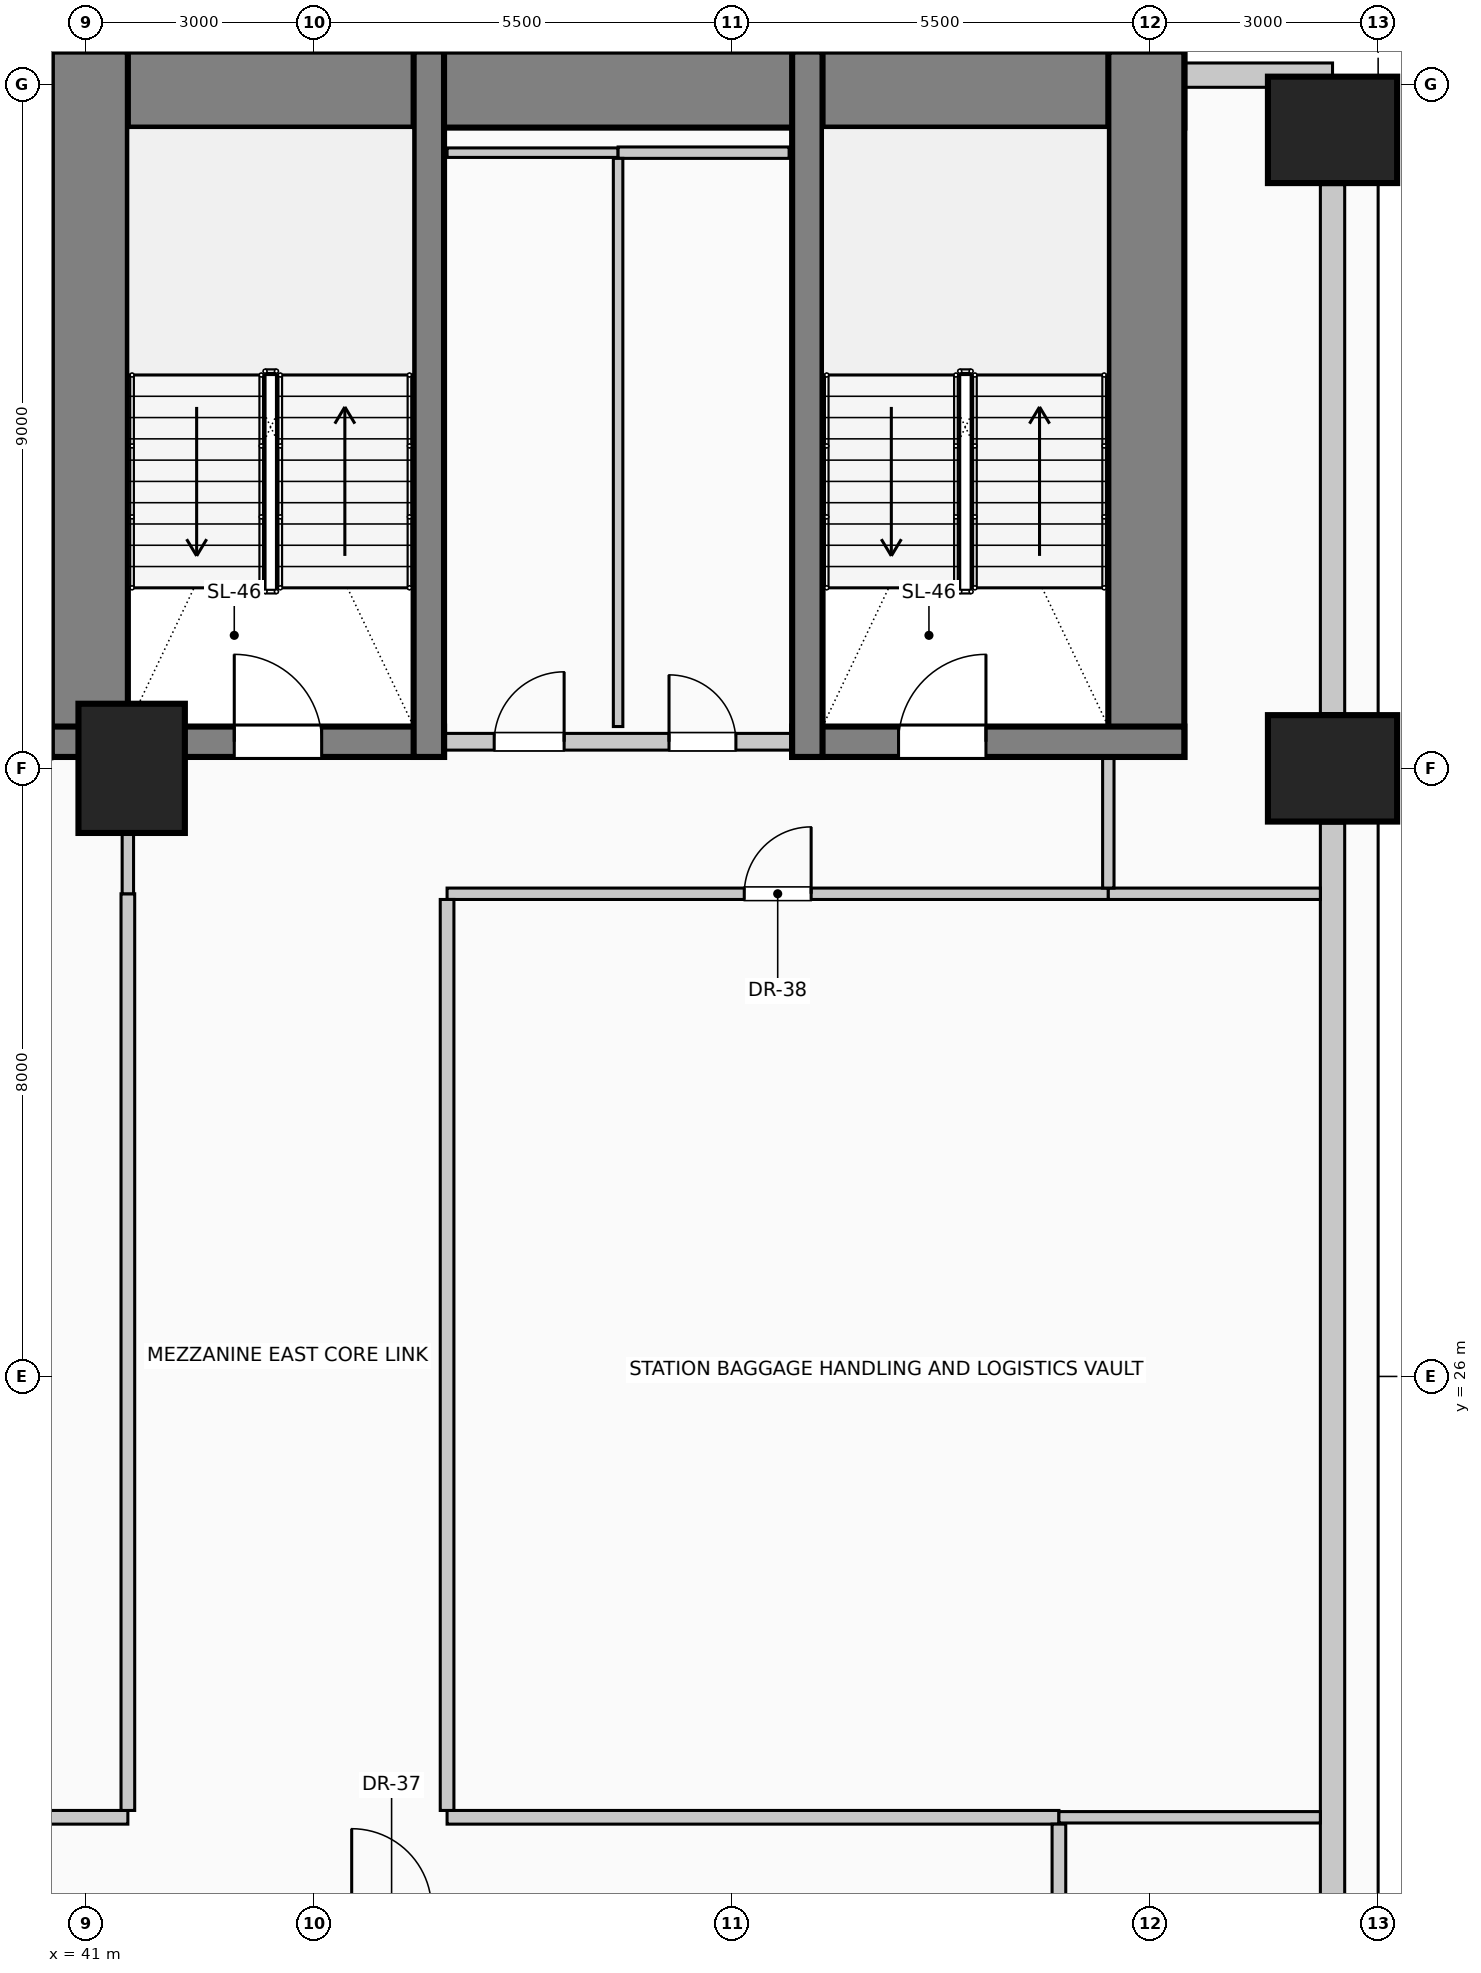
"""IFC4 building model, lengths in metres.
Left out: names, types, materials, properties, quantities, classifications, styles, units other than length and angle.
Written with IfcOpenShell. Run it as: python <this file> out.ifc"""

import sys

from ifc_helpers import new_model, si_unit, direction, frame, frame_2d, origin, origin_2d, place, context, subcontext, project, spatial, rectangle, extrude, element, fill, save


model = new_model("IFC4")
c1 = context("Model", 3, precision=1e-05, world=origin(), true_north=direction((0.0, 1.0)))
c2 = subcontext(c1, "Body", "Model", "MODEL_VIEW")
j1 = project(units=[si_unit("LENGTHUNIT", "METRE"), si_unit("PLANEANGLEUNIT", "RADIAN")], contexts=[c1])
p1 = place(None, origin())
s1 = spatial("IfcSite", under=j1, at=p1, CompositionType="ELEMENT")
p2 = place(p1, origin())
s2 = spatial("IfcBuilding", under=s1, at=p2, CompositionType="ELEMENT")
p3 = place(p2, frame((0.0, 0.0, 13.5)))
s3 = spatial("IfcBuildingStorey", under=s2, at=p3, CompositionType="ELEMENT", Elevation=13.5)
p4 = place(p3, frame((40.55, 42.93, 0.0), z_axis=(0.0, 0.0, 1.0), x_axis=(1.0, 0.0, 0.0)))
e1 = element("IfcWall", 1, at=p4, inside=s3, PredefinedType="SHEAR", context=c2, shape_type="SweptSolid", body=[
    extrude(rectangle(XDim=14.9, YDim=1.0, at=frame_2d((7.45, 0.0))), origin(), (0.0, 0.0, 1.0), 4.05),
])
for number, where, z_axis, x_axis in (
    (2, (41.05, 34.15, 0.0), (0.0, 0.0, 1.0), (0.0, 1.0, 0.0)),
    (3, (54.95, 34.15, 0.0), (0.0, 0.0, 1.0), (0.0, 1.0, 0.0)),
):
    element("IfcWall", number, at=place(p3, frame(where, z_axis=z_axis, x_axis=x_axis)), inside=s3, PredefinedType="SHEAR", context=c2, shape_type="SweptSolid", body=[
        extrude(rectangle(XDim=9.28, YDim=1.0, at=frame_2d((4.64, 0.0))), origin(), (0.0, 0.0, 1.0), 4.05),
    ])
p5 = place(p3, frame((40.55, 34.35, 0.0), z_axis=(0.0, 0.0, 1.0), x_axis=(1.0, 0.0, 0.0)))
e4 = element("IfcWall", 4, at=p5, inside=s3, PredefinedType="SHEAR", context=c2, shape_type="SweptSolid", body=[
    extrude(rectangle(XDim=5.16, YDim=0.4, at=frame_2d((2.58, 0.0))), origin(), (0.0, 0.0, 1.0), 4.05),
])
p6 = place(p5, frame((2.4, 0.0, 0.0)))
e5 = element("IfcOpeningElement", 5, at=p6, cuts=e4, PredefinedType="OPENING", context=c2, shape_type="SweptSolid", body=[
    extrude(rectangle(XDim=1.15, YDim=2.2, at=frame_2d((0.575, 1.1))), frame((0.0, 0.21, 0.0), z_axis=(0.0, -1.0, 0.0), x_axis=(1.0, 0.0, 0.0)), (0.0, 0.0, 1.0), 0.42),
])
p7 = place(p3, frame((45.51, 34.15, 0.0), z_axis=(0.0, 0.0, 1.0), x_axis=(0.0, 1.0, 0.0)))
e6 = element("IfcWall", 6, at=p7, inside=s3, PredefinedType="SHEAR", context=c2, shape_type="SweptSolid", body=[
    extrude(rectangle(XDim=9.28, YDim=0.4, at=frame_2d((4.64, 0.0))), origin(), (0.0, 0.0, 1.0), 4.05),
])
p8 = place(p3, frame((50.29, 34.35, 0.0), z_axis=(0.0, 0.0, 1.0), x_axis=(1.0, 0.0, 0.0)))
e7 = element("IfcWall", 7, at=p8, inside=s3, PredefinedType="SHEAR", context=c2, shape_type="SweptSolid", body=[
    extrude(rectangle(XDim=5.16, YDim=0.4, at=frame_2d((2.58, 0.0))), origin(), (0.0, 0.0, 1.0), 4.05),
])
p9 = place(p8, frame((1.4, 0.0, 0.0)))
e8 = element("IfcOpeningElement", 8, at=p9, cuts=e7, PredefinedType="OPENING", context=c2, shape_type="SweptSolid", body=[
    extrude(rectangle(XDim=1.15, YDim=2.2, at=frame_2d((0.575, 1.1))), frame((0.0, 0.21, 0.0), z_axis=(0.0, -1.0, 0.0), x_axis=(1.0, 0.0, 0.0)), (0.0, 0.0, 1.0), 0.42),
])
p10 = place(p3, frame((50.49, 34.15, 0.0), z_axis=(0.0, 0.0, 1.0), x_axis=(0.0, 1.0, 0.0)))
e9 = element("IfcWall", 9, at=p10, inside=s3, PredefinedType="SHEAR", context=c2, shape_type="SweptSolid", body=[
    extrude(rectangle(XDim=9.28, YDim=0.4, at=frame_2d((4.64, 0.0))), origin(), (0.0, 0.0, 1.0), 4.05),
])
for number, where, z_axis, x_axis in (
    (10, (57.4, 34.0, 0.0), (0.0, 0.0, 1.0), (0.0, 1.0, 0.0)),
    (11, (57.4, 42.4, 0.0), (0.0, 0.0, 1.0), (0.0, 1.0, 0.0)),
    (12, (41.6, 34.0, 0.0), (0.0, 0.0, 1.0), (1.0, 0.0, 0.0)),
):
    element("IfcColumn", number, at=place(p3, frame(where, z_axis=z_axis, x_axis=x_axis)), inside=s3, PredefinedType="COLUMN", context=c2, shape_type="SweptSolid", body=[
        extrude(rectangle(XDim=1.4, YDim=1.7, at=origin_2d()), origin(), (0.0, 0.0, 1.0), 4.05),
    ])
p11 = place(p3, frame((57.4, 33.28, 0.0), z_axis=(0.0, 0.0, 1.0), x_axis=(0.0, -1.0, 0.0)))
e13 = element("IfcWall", 13, at=p11, inside=s3, PredefinedType="SOLIDWALL", context=c2, shape_type="SweptSolid", body=[
    extrude(rectangle(XDim=14.56, YDim=0.32, at=frame_2d((7.28, 0.0))), origin(), (0.0, 0.0, 1.0), 2.7),
])
p12 = place(p3, frame((57.4, 41.68, 0.0), z_axis=(0.0, 0.0, 1.0), x_axis=(0.0, -1.0, 0.0)))
e14 = element("IfcWall", 14, at=p12, inside=s3, PredefinedType="SOLIDWALL", context=c2, shape_type="SweptSolid", body=[
    extrude(rectangle(XDim=6.96, YDim=0.32, at=frame_2d((3.48, 0.0))), origin(), (0.0, 0.0, 1.0), 2.7),
])
p13 = place(p3, frame((55.455, 43.12, 0.0), z_axis=(0.0, 0.0, 1.0), x_axis=(1.0, 0.0, 0.0)))
e15 = element("IfcWall", 15, at=p13, inside=s3, PredefinedType="SOLIDWALL", context=c2, shape_type="SweptSolid", body=[
    extrude(rectangle(XDim=1.945, YDim=0.32, at=frame_2d((0.972, 0.0))), origin(), (0.0, 0.0, 1.0), 3.65),
])
p14 = place(p3, frame((45.72, 34.35, 0.0), z_axis=(0.0, 0.0, 1.0), x_axis=(1.0, 0.0, 0.0)))
e16 = element("IfcWall", 16, at=p14, inside=s3, PredefinedType="PARTITIONING", context=c2, shape_type="SweptSolid", body=[
    extrude(rectangle(XDim=4.56, YDim=0.22, at=frame_2d((2.28, 0.0))), origin(), (0.0, 0.0, 1.0), 2.695),
])
p15 = place(p14, frame((0.65, 0.0, 0.0)))
e17 = element("IfcOpeningElement", 17, at=p15, cuts=e16, PredefinedType="OPENING", context=c2, shape_type="SweptSolid", body=[
    extrude(rectangle(XDim=0.92, YDim=2.1, at=frame_2d((0.46, 1.05))), frame((0.0, 0.12, 0.0), z_axis=(0.0, -1.0, 0.0), x_axis=(1.0, 0.0, 0.0)), (0.0, 0.0, 1.0), 0.24),
])
p16 = place(p14, frame((2.95, 0.0, 0.0)))
e18 = element("IfcOpeningElement", 18, at=p16, cuts=e16, PredefinedType="OPENING", context=c2, shape_type="SweptSolid", body=[
    extrude(rectangle(XDim=0.88, YDim=2.1, at=frame_2d((0.44, 1.05))), frame((0.0, 0.12, 0.0), z_axis=(0.0, -1.0, 0.0), x_axis=(1.0, 0.0, 0.0)), (0.0, 0.0, 1.0), 0.24),
])
p17 = place(p3, frame((27.2, 20.2, 0.0), z_axis=(0.0, 0.0, 1.0), x_axis=(1.0, 0.0, 0.0)))
e19 = element("IfcWall", 19, at=p17, inside=s3, PredefinedType="PARTITIONING", context=c2, shape_type="SweptSolid", body=[
    extrude(rectangle(XDim=14.35, YDim=0.18, at=frame_2d((7.175, 0.0))), origin(), (0.0, 0.0, 1.0), 3.65),
])
p18 = place(p17, frame((6.65, 0.0, 0.0)))
e20 = element("IfcOpeningElement", 20, at=p18, cuts=e19, PredefinedType="OPENING", context=c2, shape_type="SweptSolid", body=[
    extrude(rectangle(XDim=1.05, YDim=2.15, at=frame_2d((0.525, 1.075))), frame((0.0, 0.1, 0.0), z_axis=(0.0, -1.0, 0.0), x_axis=(1.0, 0.0, 0.0)), (0.0, 0.0, 1.0), 0.2),
])
p19 = place(p3, frame((45.75, 20.2, 0.0), z_axis=(0.0, 0.0, 1.0), x_axis=(1.0, 0.0, 0.0)))
e21 = element("IfcWall", 21, at=p19, inside=s3, PredefinedType="PARTITIONING", context=c2, shape_type="SweptSolid", body=[
    extrude(rectangle(XDim=8.05, YDim=0.18, at=frame_2d((4.025, 0.0))), origin(), (0.0, 0.0, 1.0), 3.65),
])
p20 = place(p3, frame((53.8, 20.2, 0.0), z_axis=(0.0, 0.0, 1.0), x_axis=(1.0, 0.0, 0.0)))
e22 = element("IfcWall", 22, at=p20, inside=s3, PredefinedType="PARTITIONING", context=c2, shape_type="SweptSolid", body=[
    extrude(rectangle(XDim=3.44, YDim=0.15, at=frame_2d((1.72, 0.0))), origin(), (0.0, 0.0, 1.0), 3.65),
])
p21 = place(p3, frame((45.75, 32.35, 0.0), z_axis=(0.0, 0.0, 1.0), x_axis=(1.0, 0.0, 0.0)))
e23 = element("IfcWall", 23, at=p21, inside=s3, PredefinedType="PARTITIONING", context=c2, shape_type="SweptSolid", body=[
    extrude(rectangle(XDim=8.7, YDim=0.15, at=frame_2d((4.35, 0.0))), origin(), (0.0, 0.0, 1.0), 3.65),
])
p22 = place(p21, frame((3.91, 0.0, 0.0)))
e24 = element("IfcOpeningElement", 24, at=p22, cuts=e23, PredefinedType="OPENING", context=c2, shape_type="SweptSolid", body=[
    extrude(rectangle(XDim=0.88, YDim=2.1, at=frame_2d((0.44, 1.05))), frame((0.0, 0.085, 0.0), z_axis=(0.0, -1.0, 0.0), x_axis=(1.0, 0.0, 0.0)), (0.0, 0.0, 1.0), 0.17),
])
p23 = place(p3, frame((54.45, 32.35, 0.0), z_axis=(0.0, 0.0, 1.0), x_axis=(1.0, 0.0, 0.0)))
e25 = element("IfcWall", 25, at=p23, inside=s3, PredefinedType="PARTITIONING", context=c2, shape_type="SweptSolid", body=[
    extrude(rectangle(XDim=2.79, YDim=0.15, at=frame_2d((1.395, 0.0))), origin(), (0.0, 0.0, 1.0), 3.65),
])
p24 = place(p3, frame((45.75, 42.1, 0.0), z_axis=(0.0, 0.0, 1.0), x_axis=(1.0, 0.0, 0.0)))
e26 = element("IfcWall", 26, at=p24, inside=s3, PredefinedType="PARTITIONING", context=c2, shape_type="SweptSolid", body=[
    extrude(rectangle(XDim=2.25, YDim=0.125, at=frame_2d((1.125, 0.0))), origin(), (0.0, 0.0, 1.0), 3.65),
])
p25 = place(p3, frame((48.0, 42.1, 0.0), z_axis=(0.0, 0.0, 1.0), x_axis=(1.0, 0.0, 0.0)))
e27 = element("IfcWall", 27, at=p25, inside=s3, PredefinedType="PARTITIONING", context=c2, shape_type="SweptSolid", body=[
    extrude(rectangle(XDim=2.25, YDim=0.15, at=frame_2d((1.125, 0.0))), origin(), (0.0, 0.0, 1.0), 3.65),
])
p26 = place(p3, frame((41.55, 20.29, 0.0), z_axis=(0.0, 0.0, 1.0), x_axis=(0.0, 1.0, 0.0)))
e28 = element("IfcWall", 28, at=p26, inside=s3, PredefinedType="PARTITIONING", context=c2, shape_type="SweptSolid", body=[
    extrude(rectangle(XDim=12.06, YDim=0.18, at=frame_2d((6.03, 0.0))), origin(), (0.0, 0.0, 1.0), 2.695),
])
p27 = place(p3, frame((41.55, 32.35, 0.0), z_axis=(0.0, 0.0, 1.0), x_axis=(0.0, 1.0, 0.0)))
e29 = element("IfcWall", 29, at=p27, inside=s3, PredefinedType="PARTITIONING", context=c2, shape_type="SweptSolid", body=[
    extrude(rectangle(XDim=0.8, YDim=0.15, at=frame_2d((0.4, 0.0))), origin(), (0.0, 0.0, 1.0), 2.695),
])
p28 = place(p3, frame((45.75, 20.29, 0.0), z_axis=(0.0, 0.0, 1.0), x_axis=(0.0, 1.0, 0.0)))
e30 = element("IfcWall", 30, at=p28, inside=s3, PredefinedType="PARTITIONING", context=c2, shape_type="SweptSolid", body=[
    extrude(rectangle(XDim=11.985, YDim=0.18, at=frame_2d((5.992, 0.0))), origin(), (0.0, 0.0, 1.0), 3.65),
])
p29 = place(p3, frame((48.0, 34.55, 0.0), z_axis=(0.0, 0.0, 1.0), x_axis=(0.0, 1.0, 0.0)))
e31 = element("IfcWall", 31, at=p29, inside=s3, PredefinedType="PARTITIONING", context=c2, shape_type="SweptSolid", body=[
    extrude(rectangle(XDim=7.475, YDim=0.125, at=frame_2d((3.737, 0.0))), origin(), (0.0, 0.0, 1.0), 3.65),
])
p30 = place(p3, frame((53.8, 19.09, 0.0), z_axis=(0.0, 0.0, 1.0), x_axis=(0.0, 1.0, 0.0)))
e32 = element("IfcWall", 32, at=p30, inside=s3, PredefinedType="PARTITIONING", context=c2, shape_type="SweptSolid", body=[
    extrude(rectangle(XDim=1.02, YDim=0.18, at=frame_2d((0.51, 0.0))), origin(), (0.0, 0.0, 1.0), 3.65),
])
p31 = place(p3, frame((54.45, 32.425, 0.0), z_axis=(0.0, 0.0, 1.0), x_axis=(0.0, 1.0, 0.0)))
e33 = element("IfcWall", 33, at=p31, inside=s3, PredefinedType="PARTITIONING", context=c2, shape_type="SweptSolid", body=[
    extrude(rectangle(XDim=1.725, YDim=0.15, at=frame_2d((0.862, 0.0))), origin(), (0.0, 0.0, 1.0), 3.65),
])
p32 = place(p6, origin())
e34 = element("IfcDoor", 34, at=p32, inside=s3, OperationType="SINGLE_SWING_LEFT", PredefinedType="DOOR", context=c2, shape_type="SweptSolid", body=[
    extrude(rectangle(XDim=1.15, YDim=2.2, at=frame_2d((0.575, 1.1))), frame((0.0, 0.025, 0.0), z_axis=(0.0, -1.0, 0.0), x_axis=(1.0, 0.0, 0.0)), (0.0, 0.0, 1.0), 0.05),
])
fill(e5, e34)
p33 = place(p15, origin())
e35 = element("IfcDoor", 35, at=p33, inside=s3, OperationType="SINGLE_SWING_RIGHT", PredefinedType="DOOR", context=c2, shape_type="SweptSolid", body=[
    extrude(rectangle(XDim=0.92, YDim=2.1, at=frame_2d((0.46, 1.05))), frame((0.0, 0.025, 0.0), z_axis=(0.0, -1.0, 0.0), x_axis=(1.0, 0.0, 0.0)), (0.0, 0.0, 1.0), 0.05),
])
fill(e17, e35)
p34 = place(p16, origin())
e36 = element("IfcDoor", 36, at=p34, inside=s3, OperationType="SINGLE_SWING_LEFT", PredefinedType="DOOR", context=c2, shape_type="SweptSolid", body=[
    extrude(rectangle(XDim=0.88, YDim=2.1, at=frame_2d((0.44, 1.05))), frame((0.0, 0.025, 0.0), z_axis=(0.0, -1.0, 0.0), x_axis=(1.0, 0.0, 0.0)), (0.0, 0.0, 1.0), 0.05),
])
fill(e18, e36)
p35 = place(p9, origin())
e37 = element("IfcDoor", 37, at=p35, inside=s3, OperationType="SINGLE_SWING_RIGHT", PredefinedType="DOOR", context=c2, shape_type="SweptSolid", body=[
    extrude(rectangle(XDim=1.15, YDim=2.2, at=frame_2d((0.575, 1.1))), frame((0.0, 0.025, 0.0), z_axis=(0.0, -1.0, 0.0), x_axis=(1.0, 0.0, 0.0)), (0.0, 0.0, 1.0), 0.05),
])
fill(e8, e37)
p36 = place(p22, origin())
e38 = element("IfcDoor", 38, at=p36, inside=s3, OperationType="SINGLE_SWING_RIGHT", PredefinedType="DOOR", context=c2, shape_type="SweptSolid", body=[
    extrude(rectangle(XDim=0.88, YDim=2.1, at=frame_2d((0.44, 1.05))), frame((0.0, 0.025, 0.0), z_axis=(0.0, -1.0, 0.0), x_axis=(1.0, 0.0, 0.0)), (0.0, 0.0, 1.0), 0.05),
])
fill(e24, e38)
save(model, sys.argv[1])
